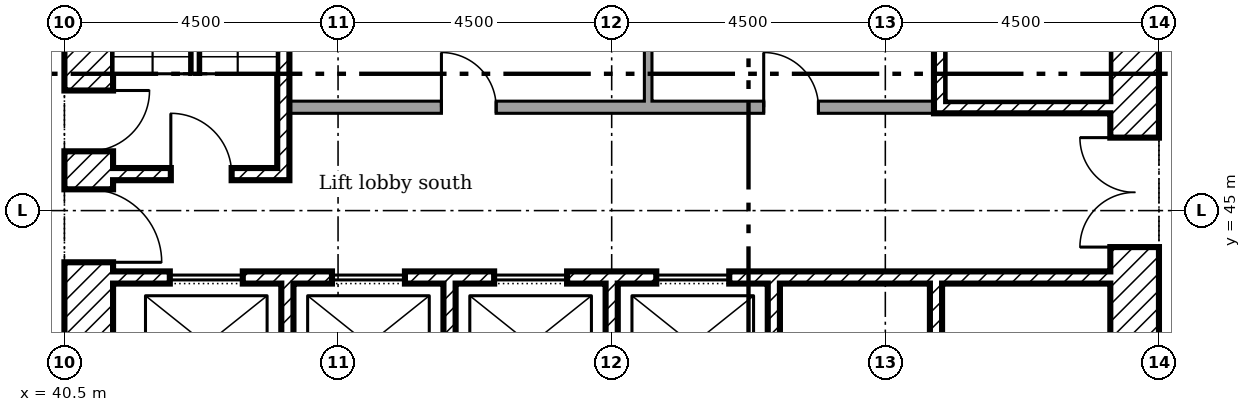
"""IFC4 building model, lengths in metres.
Left out: names, types, materials, properties, quantities, classifications, styles, units other than length and angle.
Written with IfcOpenShell. Run it as: python <this file> out.ifc"""

import sys

from ifc_helpers import new_model, si_unit, direction, frame, frame_2d, origin, place, context, subcontext, project, spatial, rectangle, extrude, element, fill, save


model = new_model("IFC4")
c1 = context("Model", 3, precision=1e-05, world=origin(), true_north=direction((0.0, 1.0)))
c2 = subcontext(c1, "Body", "Model", "MODEL_VIEW")
j1 = project(units=[si_unit("LENGTHUNIT", "METRE"), si_unit("PLANEANGLEUNIT", "RADIAN")], contexts=[c1])
p1 = place(None, origin())
s1 = spatial("IfcSite", under=j1, at=p1, CompositionType="ELEMENT")
p2 = place(p1, origin())
s2 = spatial("IfcBuilding", under=s1, at=p2, CompositionType="ELEMENT")
p3 = place(p2, frame((0.0, 0.0, 51.0)))
s3 = spatial("IfcBuildingStorey", under=s2, at=p3, CompositionType="ELEMENT", Elevation=51.0)
p4 = place(p3, frame((58.1, 40.5, 0.0), z_axis=(0.0, 0.0, 1.0), x_axis=(0.0, 1.0, 0.0)))
e1 = element("IfcWall", 1, at=p4, inside=s3, PredefinedType="SHEAR", context=c2, shape_type="SweptSolid", body=[
    extrude(rectangle(XDim=18.0, YDim=0.8, at=frame_2d((9.0, 0.0))), origin(), (0.0, 0.0, 1.0), 3.35),
])
p5 = place(p4, frame((13.15, 0.0, 0.0)))
e2 = element("IfcOpeningElement", 2, at=p5, cuts=e1, PredefinedType="OPENING", context=c2, shape_type="SweptSolid", body=[
    extrude(rectangle(XDim=1.2, YDim=2.1, at=frame_2d((0.6, 1.05))), frame((0.0, 0.41, 0.0), z_axis=(0.0, -1.0, 0.0), x_axis=(1.0, 0.0, 0.0)), (0.0, 0.0, 1.0), 0.82),
])
p6 = place(p4, frame((3.9, 0.0, 0.0)))
e3 = element("IfcOpeningElement", 3, at=p6, cuts=e1, PredefinedType="OPENING", context=c2, shape_type="SweptSolid", body=[
    extrude(rectangle(XDim=1.8, YDim=2.1, at=frame_2d((0.9, 1.05))), frame((0.0, 0.41, 0.0), z_axis=(0.0, -1.0, 0.0), x_axis=(1.0, 0.0, 0.0)), (0.0, 0.0, 1.0), 0.82),
])
p7 = place(p4, frame((11.525, 0.0, 0.0)))
e4 = element("IfcOpeningElement", 4, at=p7, cuts=e1, PredefinedType="OPENING", context=c2, shape_type="SweptSolid", body=[
    extrude(rectangle(XDim=1.0, YDim=2.1, at=frame_2d((0.5, 1.05))), frame((0.0, 0.41, 0.0), z_axis=(0.0, -1.0, 0.0), x_axis=(1.0, 0.0, 0.0)), (0.0, 0.0, 1.0), 0.82),
])
p8 = place(p3, frame((40.9, 40.5, 0.0), z_axis=(0.0, 0.0, 1.0), x_axis=(0.0, 1.0, 0.0)))
e5 = element("IfcWall", 5, at=p8, inside=s3, PredefinedType="SHEAR", context=c2, shape_type="SweptSolid", body=[
    extrude(rectangle(XDim=18.0, YDim=0.8, at=frame_2d((9.0, 0.0))), origin(), (0.0, 0.0, 1.0), 3.35),
])
p9 = place(p8, frame((3.65, 0.0, 0.0)))
e6 = element("IfcOpeningElement", 6, at=p9, cuts=e5, PredefinedType="OPENING", context=c2, shape_type="SweptSolid", body=[
    extrude(rectangle(XDim=1.2, YDim=2.1, at=frame_2d((0.6, 1.05))), frame((0.0, 0.41, 0.0), z_axis=(0.0, -1.0, 0.0), x_axis=(1.0, 0.0, 0.0)), (0.0, 0.0, 1.0), 0.82),
])
p10 = place(p8, frame((5.475, 0.0, 0.0)))
e7 = element("IfcOpeningElement", 7, at=p10, cuts=e5, PredefinedType="OPENING", context=c2, shape_type="SweptSolid", body=[
    extrude(rectangle(XDim=1.0, YDim=2.1, at=frame_2d((0.5, 1.05))), frame((0.0, 0.41, 0.0), z_axis=(0.0, -1.0, 0.0), x_axis=(1.0, 0.0, 0.0)), (0.0, 0.0, 1.0), 0.82),
])
p11 = place(p8, frame((12.3, 0.0, 0.0)))
e8 = element("IfcOpeningElement", 8, at=p11, cuts=e5, PredefinedType="OPENING", context=c2, shape_type="SweptSolid", body=[
    extrude(rectangle(XDim=1.0, YDim=2.1, at=frame_2d((0.5, 1.05))), frame((0.0, 0.41, 0.0), z_axis=(0.0, -1.0, 0.0), x_axis=(1.0, 0.0, 0.0)), (0.0, 0.0, 1.0), 0.82),
])
for number, where, z_axis, x_axis in (
    (9, (44.167, 41.3, 0.0), (0.0, 0.0, 1.0), (0.0, 1.0, 0.0)),
    (10, (46.833, 41.3, 0.0), (0.0, 0.0, 1.0), (0.0, 1.0, 0.0)),
    (11, (49.5, 41.3, 0.0), (0.0, 0.0, 1.0), (0.0, 1.0, 0.0)),
    (12, (52.167, 41.3, 0.0), (0.0, 0.0, 1.0), (0.0, 1.0, 0.0)),
    (13, (54.833, 41.3, 0.0), (0.0, 0.0, 1.0), (0.0, 1.0, 0.0)),
):
    element("IfcWall", number, at=place(p3, frame(where, z_axis=z_axis, x_axis=x_axis)), inside=s3, PredefinedType="SHEAR", context=c2, shape_type="SweptSolid", body=[
        extrude(rectangle(XDim=2.5, YDim=0.2, at=frame_2d((1.25, 0.0))), origin(), (0.0, 0.0, 1.0), 3.35),
    ])
p12 = place(p3, frame((41.3, 43.9, 0.0)))
e14 = element("IfcWall", 14, at=p12, inside=s3, PredefinedType="SHEAR", context=c2, shape_type="SweptSolid", body=[
    extrude(rectangle(XDim=16.4, YDim=0.2, at=frame_2d((8.2, 0.0))), origin(), (0.0, 0.0, 1.0), 3.35),
])
p13 = place(p12, frame((0.933, 0.0, 0.0)))
e15 = element("IfcOpeningElement", 15, at=p13, cuts=e14, PredefinedType="OPENING", context=c2, shape_type="SweptSolid", body=[
    extrude(rectangle(XDim=1.2, YDim=2.1, at=frame_2d((0.6, 1.05))), frame((0.0, 0.11, 0.0), z_axis=(0.0, -1.0, 0.0), x_axis=(1.0, 0.0, 0.0)), (0.0, 0.0, 1.0), 0.22),
])
p14 = place(p12, frame((3.6, 0.0, 0.0)))
e16 = element("IfcOpeningElement", 16, at=p14, cuts=e14, PredefinedType="OPENING", context=c2, shape_type="SweptSolid", body=[
    extrude(rectangle(XDim=1.2, YDim=2.1, at=frame_2d((0.6, 1.05))), frame((0.0, 0.11, 0.0), z_axis=(0.0, -1.0, 0.0), x_axis=(1.0, 0.0, 0.0)), (0.0, 0.0, 1.0), 0.22),
])
p15 = place(p12, frame((6.267, 0.0, 0.0)))
e17 = element("IfcOpeningElement", 17, at=p15, cuts=e14, PredefinedType="OPENING", context=c2, shape_type="SweptSolid", body=[
    extrude(rectangle(XDim=1.2, YDim=2.1, at=frame_2d((0.6, 1.05))), frame((0.0, 0.11, 0.0), z_axis=(0.0, -1.0, 0.0), x_axis=(1.0, 0.0, 0.0)), (0.0, 0.0, 1.0), 0.22),
])
p16 = place(p12, frame((8.933, 0.0, 0.0)))
e18 = element("IfcOpeningElement", 18, at=p16, cuts=e14, PredefinedType="OPENING", context=c2, shape_type="SweptSolid", body=[
    extrude(rectangle(XDim=1.2, YDim=2.1, at=frame_2d((0.6, 1.05))), frame((0.0, 0.11, 0.0), z_axis=(0.0, -1.0, 0.0), x_axis=(1.0, 0.0, 0.0)), (0.0, 0.0, 1.0), 0.22),
])
p17 = place(p3, frame((44.1, 45.5, 0.0), z_axis=(0.0, 0.0, 1.0), x_axis=(0.0, 1.0, 0.0)))
e19 = element("IfcWall", 19, at=p17, inside=s3, PredefinedType="SHEAR", context=c2, shape_type="SweptSolid", body=[
    extrude(rectangle(XDim=6.9, YDim=0.2, at=frame_2d((3.45, 0.0))), origin(), (0.0, 0.0, 1.0), 3.35),
])
p18 = place(p3, frame((41.3, 45.6, 0.0)))
e20 = element("IfcWall", 20, at=p18, inside=s3, PredefinedType="SHEAR", context=c2, shape_type="SweptSolid", body=[
    extrude(rectangle(XDim=2.7, YDim=0.2, at=frame_2d((1.35, 0.0))), origin(), (0.0, 0.0, 1.0), 3.35),
])
p19 = place(p18, frame((0.95, 0.0, 0.0)))
e21 = element("IfcOpeningElement", 21, at=p19, cuts=e20, PredefinedType="OPENING", context=c2, shape_type="SweptSolid", body=[
    extrude(rectangle(XDim=1.0, YDim=2.1, at=frame_2d((0.5, 1.05))), frame((0.0, 0.11, 0.0), z_axis=(0.0, -1.0, 0.0), x_axis=(1.0, 0.0, 0.0)), (0.0, 0.0, 1.0), 0.22),
])
p20 = place(p3, frame((54.8, 46.7, 0.0)))
e22 = element("IfcWall", 22, at=p20, inside=s3, PredefinedType="SHEAR", context=c2, shape_type="SweptSolid", body=[
    extrude(rectangle(XDim=2.9, YDim=0.2, at=frame_2d((1.45, 0.0))), origin(), (0.0, 0.0, 1.0), 3.35),
])
p21 = place(p3, frame((54.9, 46.8, 0.0), z_axis=(0.0, 0.0, 1.0), x_axis=(0.0, 1.0, 0.0)))
e23 = element("IfcWall", 23, at=p21, inside=s3, PredefinedType="SHEAR", context=c2, shape_type="SweptSolid", body=[
    extrude(rectangle(XDim=6.5, YDim=0.2, at=frame_2d((3.25, 0.0))), origin(), (0.0, 0.0, 1.0), 3.35),
])
p22 = place(p3, frame((44.2, 46.7, 0.0)))
e24 = element("IfcWall", 24, at=p22, inside=s3, PredefinedType="PARTITIONING", context=c2, shape_type="SweptSolid", body=[
    extrude(rectangle(XDim=10.6, YDim=0.2, at=frame_2d((5.3, 0.0))), origin(), (0.0, 0.0, 1.0), 3.35),
])
p23 = place(p22, frame((2.5, 0.0, 0.0)))
e25 = element("IfcOpeningElement", 25, at=p23, cuts=e24, PredefinedType="OPENING", context=c2, shape_type="SweptSolid", body=[
    extrude(rectangle(XDim=0.9, YDim=2.1, at=frame_2d((0.45, 1.05))), frame((0.0, 0.11, 0.0), z_axis=(0.0, -1.0, 0.0), x_axis=(1.0, 0.0, 0.0)), (0.0, 0.0, 1.0), 0.22),
])
p24 = place(p22, frame((7.8, 0.0, 0.0)))
e26 = element("IfcOpeningElement", 26, at=p24, cuts=e24, PredefinedType="OPENING", context=c2, shape_type="SweptSolid", body=[
    extrude(rectangle(XDim=0.9, YDim=2.1, at=frame_2d((0.45, 1.05))), frame((0.0, 0.11, 0.0), z_axis=(0.0, -1.0, 0.0), x_axis=(1.0, 0.0, 0.0)), (0.0, 0.0, 1.0), 0.22),
])
p25 = place(p3, frame((50.1, 46.8, 0.0), z_axis=(0.0, 0.0, 1.0), x_axis=(0.0, 1.0, 0.0)))
e27 = element("IfcWall", 27, at=p25, inside=s3, PredefinedType="PARTITIONING", context=c2, shape_type="SweptSolid", body=[
    extrude(rectangle(XDim=1.962, YDim=0.125, at=frame_2d((0.981, 0.0))), origin(), (0.0, 0.0, 1.0), 3.35),
])
p26 = place(p6, origin())
e28 = element("IfcDoor", 28, at=p26, inside=s3, OperationType="DOUBLE_DOOR_SINGLE_SWING", PredefinedType="DOOR", context=c2, shape_type="SweptSolid", body=[
    extrude(rectangle(XDim=1.8, YDim=2.1, at=frame_2d((0.9, 1.05))), frame((0.0, 0.025, 0.0), z_axis=(0.0, -1.0, 0.0), x_axis=(1.0, 0.0, 0.0)), (0.0, 0.0, 1.0), 0.05),
])
fill(e3, e28)
p27 = place(p9, frame((1.2, 0.0, 0.0), x_axis=(-1.0, 0.0, 0.0)))
e29 = element("IfcDoor", 29, at=p27, inside=s3, OperationType="SINGLE_SWING_LEFT", PredefinedType="DOOR", context=c2, shape_type="SweptSolid", body=[
    extrude(rectangle(XDim=1.2, YDim=2.1, at=frame_2d((0.6, 1.05))), frame((0.0, 0.025, 0.0), z_axis=(0.0, -1.0, 0.0), x_axis=(1.0, 0.0, 0.0)), (0.0, 0.0, 1.0), 0.05),
])
fill(e6, e29)
p28 = place(p19, origin())
e30 = element("IfcDoor", 30, at=p28, inside=s3, OperationType="SINGLE_SWING_RIGHT", PredefinedType="DOOR", context=c2, shape_type="SweptSolid", body=[
    extrude(rectangle(XDim=1.0, YDim=2.1, at=frame_2d((0.5, 1.05))), frame((0.0, 0.025, 0.0), z_axis=(0.0, -1.0, 0.0), x_axis=(1.0, 0.0, 0.0)), (0.0, 0.0, 1.0), 0.05),
])
fill(e21, e30)
p29 = place(p10, frame((1.0, 0.0, 0.0), x_axis=(-1.0, 0.0, 0.0)))
e31 = element("IfcDoor", 31, at=p29, inside=s3, OperationType="SINGLE_SWING_RIGHT", PredefinedType="DOOR", context=c2, shape_type="SweptSolid", body=[
    extrude(rectangle(XDim=1.0, YDim=2.1, at=frame_2d((0.5, 1.05))), frame((0.0, 0.025, 0.0), z_axis=(0.0, -1.0, 0.0), x_axis=(1.0, 0.0, 0.0)), (0.0, 0.0, 1.0), 0.05),
])
fill(e7, e31)
p30 = place(p23, origin())
e32 = element("IfcDoor", 32, at=p30, inside=s3, OperationType="SINGLE_SWING_RIGHT", PredefinedType="DOOR", context=c2, shape_type="SweptSolid", body=[
    extrude(rectangle(XDim=0.9, YDim=2.1, at=frame_2d((0.45, 1.05))), frame((0.0, 0.025, 0.0), z_axis=(0.0, -1.0, 0.0), x_axis=(1.0, 0.0, 0.0)), (0.0, 0.0, 1.0), 0.05),
])
fill(e25, e32)
p31 = place(p24, origin())
e33 = element("IfcDoor", 33, at=p31, inside=s3, OperationType="SINGLE_SWING_RIGHT", PredefinedType="DOOR", context=c2, shape_type="SweptSolid", body=[
    extrude(rectangle(XDim=0.9, YDim=2.1, at=frame_2d((0.45, 1.05))), frame((0.0, 0.025, 0.0), z_axis=(0.0, -1.0, 0.0), x_axis=(1.0, 0.0, 0.0)), (0.0, 0.0, 1.0), 0.05),
])
fill(e26, e33)
p32 = place(p13, origin())
e34 = element("IfcDoor", 34, at=p32, inside=s3, OperationType="SLIDING_TO_LEFT", PredefinedType="DOOR", context=c2, shape_type="SweptSolid", body=[
    extrude(rectangle(XDim=1.2, YDim=2.1, at=frame_2d((0.6, 1.05))), frame((0.0, 0.025, 0.0), z_axis=(0.0, -1.0, 0.0), x_axis=(1.0, 0.0, 0.0)), (0.0, 0.0, 1.0), 0.05),
])
fill(e15, e34)
p33 = place(p14, origin())
e35 = element("IfcDoor", 35, at=p33, inside=s3, OperationType="SLIDING_TO_LEFT", PredefinedType="DOOR", context=c2, shape_type="SweptSolid", body=[
    extrude(rectangle(XDim=1.2, YDim=2.1, at=frame_2d((0.6, 1.05))), frame((0.0, 0.025, 0.0), z_axis=(0.0, -1.0, 0.0), x_axis=(1.0, 0.0, 0.0)), (0.0, 0.0, 1.0), 0.05),
])
fill(e16, e35)
p34 = place(p15, origin())
e36 = element("IfcDoor", 36, at=p34, inside=s3, OperationType="SLIDING_TO_LEFT", PredefinedType="DOOR", context=c2, shape_type="SweptSolid", body=[
    extrude(rectangle(XDim=1.2, YDim=2.1, at=frame_2d((0.6, 1.05))), frame((0.0, 0.025, 0.0), z_axis=(0.0, -1.0, 0.0), x_axis=(1.0, 0.0, 0.0)), (0.0, 0.0, 1.0), 0.05),
])
fill(e17, e36)
p35 = place(p16, origin())
e37 = element("IfcDoor", 37, at=p35, inside=s3, OperationType="SLIDING_TO_LEFT", PredefinedType="DOOR", context=c2, shape_type="SweptSolid", body=[
    extrude(rectangle(XDim=1.2, YDim=2.1, at=frame_2d((0.6, 1.05))), frame((0.0, 0.025, 0.0), z_axis=(0.0, -1.0, 0.0), x_axis=(1.0, 0.0, 0.0)), (0.0, 0.0, 1.0), 0.05),
])
fill(e18, e37)
save(model, sys.argv[1])
